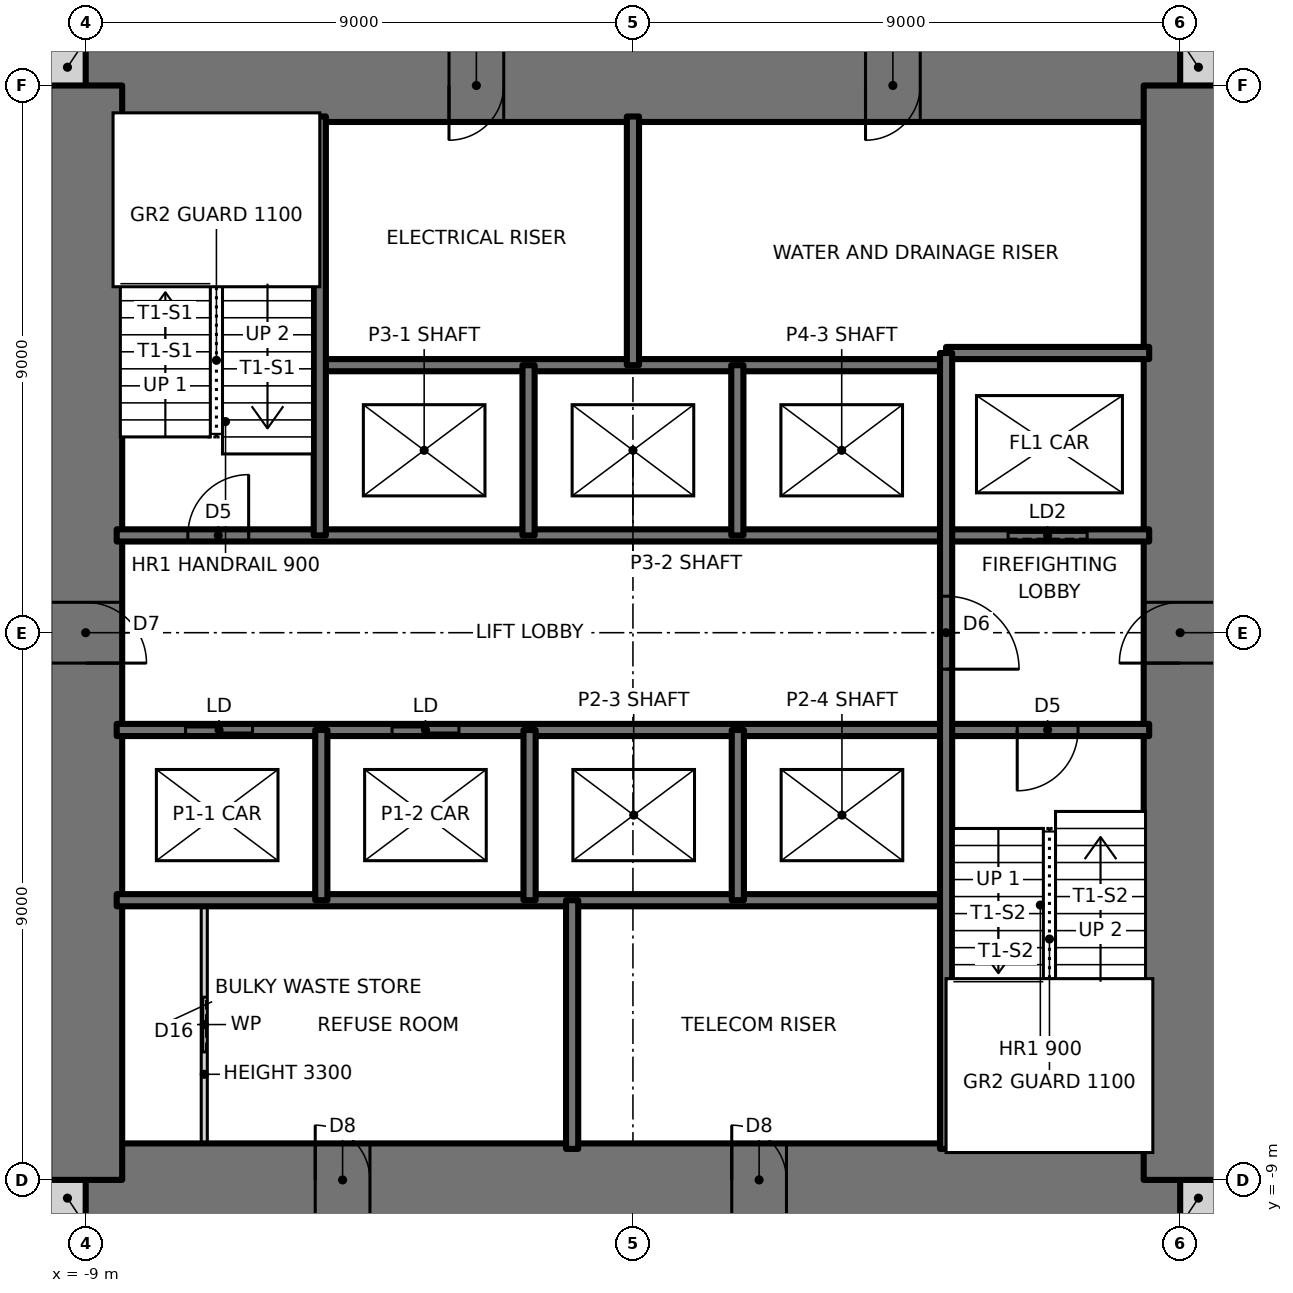
"""IFC4 building model, lengths in metres.
Left out: names, types, materials, properties, quantities, classifications, styles, units other than length and angle.
Written with IfcOpenShell. Run it as: python <this file> out.ifc"""

import sys

from ifc_helpers import new_model, si_unit, direction, frame, frame_2d, origin, place, context, subcontext, project, spatial, rectangle, extrude, element, fill, save


model = new_model("IFC4")
c1 = context("Model", 3, precision=1e-05, world=origin(), true_north=direction((0.0, 1.0)))
c2 = subcontext(c1, "Body", "Model", "MODEL_VIEW")
j1 = project(units=[si_unit("LENGTHUNIT", "METRE"), si_unit("PLANEANGLEUNIT", "RADIAN")], contexts=[c1])
p1 = place(None, origin())
s1 = spatial("IfcSite", under=j1, at=p1, CompositionType="ELEMENT")
p2 = place(p1, origin())
s2 = spatial("IfcBuilding", under=s1, at=p2, CompositionType="ELEMENT")
p3 = place(p2, frame((0.0, 0.0, 15.0)))
s3 = spatial("IfcBuildingStorey", under=s2, at=p3, CompositionType="ELEMENT", Elevation=15.0)
for number, where, z_axis, x_axis in (
    (1, (-9.6, -9.3, 0.0), (0.0, 0.0, 1.0), (1.0, 0.0, 0.0)),
    (2, (9.0, -9.3, 0.0), (0.0, 0.0, 1.0), (1.0, 0.0, 0.0)),
    (3, (9.0, 9.3, 0.0), (0.0, 0.0, 1.0), (1.0, 0.0, 0.0)),
    (4, (-9.6, 9.3, 0.0), (0.0, 0.0, 1.0), (1.0, 0.0, 0.0)),
):
    element("IfcWall", number, at=place(p3, frame(where, z_axis=z_axis, x_axis=x_axis)), inside=s3, PredefinedType="SOLIDWALL", context=c2, shape_type="SweptSolid", body=[
        extrude(rectangle(XDim=0.6, YDim=0.6, at=frame_2d((0.3, 0.0))), origin(), (0.0, 0.0, 1.0), 3.5),
    ])
p4 = place(p3, frame((-9.0, -9.0, 0.0), z_axis=(0.0, 0.0, 1.0), x_axis=(1.0, 0.0, 0.0)))
e5 = element("IfcWall", 5, at=p4, inside=s3, PredefinedType="SHEAR", context=c2, shape_type="SweptSolid", body=[
    extrude(rectangle(XDim=18.0, YDim=1.2, at=frame_2d((9.0, 0.0))), origin(), (0.0, 0.0, 1.0), 3.5),
])
p5 = place(p4, frame((3.775, 0.0, 0.0)))
e6 = element("IfcOpeningElement", 6, at=p5, cuts=e5, PredefinedType="OPENING", context=c2, shape_type="SweptSolid", body=[
    extrude(rectangle(XDim=0.9, YDim=2.1, at=frame_2d((0.45, 1.05))), frame((0.0, 0.61, 0.0), z_axis=(0.0, -1.0, 0.0), x_axis=(1.0, 0.0, 0.0)), (0.0, 0.0, 1.0), 1.22),
])
p6 = place(p4, frame((10.625, 0.0, 0.0)))
e7 = element("IfcOpeningElement", 7, at=p6, cuts=e5, PredefinedType="OPENING", context=c2, shape_type="SweptSolid", body=[
    extrude(rectangle(XDim=0.9, YDim=2.1, at=frame_2d((0.45, 1.05))), frame((0.0, 0.61, 0.0), z_axis=(0.0, -1.0, 0.0), x_axis=(1.0, 0.0, 0.0)), (0.0, 0.0, 1.0), 1.22),
])
p7 = place(p3, frame((9.0, 9.0, 0.0), z_axis=(0.0, 0.0, 1.0), x_axis=(-1.0, 0.0, 0.0)))
e8 = element("IfcWall", 8, at=p7, inside=s3, PredefinedType="SHEAR", context=c2, shape_type="SweptSolid", body=[
    extrude(rectangle(XDim=18.0, YDim=1.2, at=frame_2d((9.0, 0.0))), origin(), (0.0, 0.0, 1.0), 3.5),
])
p8 = place(p7, frame((11.125, 0.0, 0.0)))
e9 = element("IfcOpeningElement", 9, at=p8, cuts=e8, PredefinedType="OPENING", context=c2, shape_type="SweptSolid", body=[
    extrude(rectangle(XDim=0.9, YDim=2.1, at=frame_2d((0.45, 1.05))), frame((0.0, 0.61, 0.0), z_axis=(0.0, -1.0, 0.0), x_axis=(1.0, 0.0, 0.0)), (0.0, 0.0, 1.0), 1.22),
])
p9 = place(p7, frame((4.275, 0.0, 0.0)))
e10 = element("IfcOpeningElement", 10, at=p9, cuts=e8, PredefinedType="OPENING", context=c2, shape_type="SweptSolid", body=[
    extrude(rectangle(XDim=0.9, YDim=2.1, at=frame_2d((0.45, 1.05))), frame((0.0, 0.61, 0.0), z_axis=(0.0, -1.0, 0.0), x_axis=(1.0, 0.0, 0.0)), (0.0, 0.0, 1.0), 1.22),
])
p10 = place(p3, frame((9.0, -9.0, 0.0), z_axis=(0.0, 0.0, 1.0), x_axis=(0.0, 1.0, 0.0)))
e11 = element("IfcWall", 11, at=p10, inside=s3, PredefinedType="SHEAR", context=c2, shape_type="SweptSolid", body=[
    extrude(rectangle(XDim=18.0, YDim=1.2, at=frame_2d((9.0, 0.0))), origin(), (0.0, 0.0, 1.0), 3.5),
])
p11 = place(p10, frame((8.5, 0.0, 0.0)))
e12 = element("IfcOpeningElement", 12, at=p11, cuts=e11, PredefinedType="OPENING", context=c2, shape_type="SweptSolid", body=[
    extrude(rectangle(XDim=1.0, YDim=2.1, at=frame_2d((0.5, 1.05))), frame((0.0, 0.61, 0.0), z_axis=(0.0, -1.0, 0.0), x_axis=(1.0, 0.0, 0.0)), (0.0, 0.0, 1.0), 1.22),
])
p12 = place(p3, frame((-9.0, 9.0, 0.0), z_axis=(0.0, 0.0, 1.0), x_axis=(0.0, -1.0, 0.0)))
e13 = element("IfcWall", 13, at=p12, inside=s3, PredefinedType="SHEAR", context=c2, shape_type="SweptSolid", body=[
    extrude(rectangle(XDim=18.0, YDim=1.2, at=frame_2d((9.0, 0.0))), origin(), (0.0, 0.0, 1.0), 3.5),
])
p13 = place(p12, frame((8.5, 0.0, 0.0)))
e14 = element("IfcOpeningElement", 14, at=p13, cuts=e13, PredefinedType="OPENING", context=c2, shape_type="SweptSolid", body=[
    extrude(rectangle(XDim=1.0, YDim=2.1, at=frame_2d((0.5, 1.05))), frame((0.0, 0.61, 0.0), z_axis=(0.0, -1.0, 0.0), x_axis=(1.0, 0.0, 0.0)), (0.0, 0.0, 1.0), 1.22),
])
p14 = place(p3, frame((-8.49, -4.4, 0.0), z_axis=(0.0, 0.0, 1.0), x_axis=(1.0, 0.0, 0.0)))
e15 = element("IfcWall", 15, at=p14, inside=s3, PredefinedType="SOLIDWALL", context=c2, shape_type="SweptSolid", body=[
    extrude(rectangle(XDim=13.64, YDim=0.2, at=frame_2d((6.82, 0.0))), origin(), (0.0, 0.0, 1.0), 3.5),
])
p15 = place(p3, frame((-8.49, -1.6, 0.0), z_axis=(0.0, 0.0, 1.0), x_axis=(1.0, 0.0, 0.0)))
e16 = element("IfcWall", 16, at=p15, inside=s3, PredefinedType="SOLIDWALL", context=c2, shape_type="SweptSolid", body=[
    extrude(rectangle(XDim=16.98, YDim=0.2, at=frame_2d((8.49, 0.0))), origin(), (0.0, 0.0, 1.0), 3.5),
])
p16 = place(p15, frame((14.81, 0.0, 0.0)))
e17 = element("IfcOpeningElement", 17, at=p16, cuts=e16, PredefinedType="OPENING", context=c2, shape_type="SweptSolid", body=[
    extrude(rectangle(XDim=1.0, YDim=2.1, at=frame_2d((0.5, 1.05))), frame((0.0, 0.11, 0.0), z_axis=(0.0, -1.0, 0.0), x_axis=(1.0, 0.0, 0.0)), (0.0, 0.0, 1.0), 0.22),
])
p17 = place(p15, frame((1.133, 0.0, 0.0)))
e18 = element("IfcOpeningElement", 18, at=p17, cuts=e16, PredefinedType="OPENING", context=c2, shape_type="SweptSolid", body=[
    extrude(rectangle(XDim=1.1, YDim=2.1, at=frame_2d((0.55, 1.05))), frame((0.0, 0.11, 0.0), z_axis=(0.0, -1.0, 0.0), x_axis=(1.0, 0.0, 0.0)), (0.0, 0.0, 1.0), 0.22),
])
p18 = place(p15, frame((4.528, 0.0, 0.0)))
e19 = element("IfcOpeningElement", 19, at=p18, cuts=e16, PredefinedType="OPENING", context=c2, shape_type="SweptSolid", body=[
    extrude(rectangle(XDim=1.1, YDim=2.1, at=frame_2d((0.55, 1.05))), frame((0.0, 0.11, 0.0), z_axis=(0.0, -1.0, 0.0), x_axis=(1.0, 0.0, 0.0)), (0.0, 0.0, 1.0), 0.22),
])
p19 = place(p3, frame((-8.49, 1.6, 0.0), z_axis=(0.0, 0.0, 1.0), x_axis=(1.0, 0.0, 0.0)))
e20 = element("IfcWall", 20, at=p19, inside=s3, PredefinedType="SOLIDWALL", context=c2, shape_type="SweptSolid", body=[
    extrude(rectangle(XDim=16.98, YDim=0.2, at=frame_2d((8.49, 0.0))), origin(), (0.0, 0.0, 1.0), 3.5),
])
p20 = place(p19, frame((1.17, 0.0, 0.0)))
e21 = element("IfcOpeningElement", 21, at=p20, cuts=e20, PredefinedType="OPENING", context=c2, shape_type="SweptSolid", body=[
    extrude(rectangle(XDim=1.0, YDim=2.1, at=frame_2d((0.5, 1.05))), frame((0.0, 0.11, 0.0), z_axis=(0.0, -1.0, 0.0), x_axis=(1.0, 0.0, 0.0)), (0.0, 0.0, 1.0), 0.22),
])
p21 = place(p19, frame((14.66, 0.0, 0.0)))
e22 = element("IfcOpeningElement", 22, at=p21, cuts=e20, PredefinedType="OPENING", context=c2, shape_type="SweptSolid", body=[
    extrude(rectangle(XDim=1.3, YDim=2.1, at=frame_2d((0.65, 1.05))), frame((0.0, 0.11, 0.0), z_axis=(0.0, -1.0, 0.0), x_axis=(1.0, 0.0, 0.0)), (0.0, 0.0, 1.0), 0.22),
])
p22 = place(p3, frame((-5.15, 4.4, 0.0), z_axis=(0.0, 0.0, 1.0), x_axis=(1.0, 0.0, 0.0)))
e23 = element("IfcWall", 23, at=p22, inside=s3, PredefinedType="SOLIDWALL", context=c2, shape_type="SweptSolid", body=[
    extrude(rectangle(XDim=10.3, YDim=0.2, at=frame_2d((5.15, 0.0))), origin(), (0.0, 0.0, 1.0), 3.5),
])
p23 = place(p3, frame((5.15, 4.6, 0.0), z_axis=(0.0, 0.0, 1.0), x_axis=(1.0, 0.0, 0.0)))
e24 = element("IfcWall", 24, at=p23, inside=s3, PredefinedType="SOLIDWALL", context=c2, shape_type="SweptSolid", body=[
    extrude(rectangle(XDim=3.34, YDim=0.2, at=frame_2d((1.67, 0.0))), origin(), (0.0, 0.0, 1.0), 3.5),
])
p24 = place(p3, frame((5.15, -8.49, 0.0), z_axis=(0.0, 0.0, 1.0), x_axis=(0.0, 1.0, 0.0)))
e25 = element("IfcWall", 25, at=p24, inside=s3, PredefinedType="SOLIDWALL", context=c2, shape_type="SweptSolid", body=[
    extrude(rectangle(XDim=13.09, YDim=0.2, at=frame_2d((6.545, 0.0))), origin(), (0.0, 0.0, 1.0), 3.5),
])
p25 = place(p24, frame((7.89, 0.0, 0.0)))
e26 = element("IfcOpeningElement", 26, at=p25, cuts=e25, PredefinedType="OPENING", context=c2, shape_type="SweptSolid", body=[
    extrude(rectangle(XDim=1.2, YDim=2.1, at=frame_2d((0.6, 1.05))), frame((0.0, 0.11, 0.0), z_axis=(0.0, -1.0, 0.0), x_axis=(1.0, 0.0, 0.0)), (0.0, 0.0, 1.0), 0.22),
])
for number, where, z_axis, x_axis in (
    (27, (1.725, -4.4, 0.0), (0.0, 0.0, 1.0), (0.0, 1.0, 0.0)),
    (28, (1.717, 1.6, 0.0), (0.0, 0.0, 1.0), (0.0, 1.0, 0.0)),
):
    element("IfcWall", number, at=place(p3, frame(where, z_axis=z_axis, x_axis=x_axis)), inside=s3, PredefinedType="SOLIDWALL", context=c2, shape_type="SweptSolid", body=[
        extrude(rectangle(XDim=2.8, YDim=0.2, at=frame_2d((1.4, 0.0))), origin(), (0.0, 0.0, 1.0), 3.5),
    ])
for number, where, z_axis, x_axis in (
    (29, (0.0, 4.4, 0.0), (0.0, 0.0, 1.0), (0.0, 1.0, 0.0)),
    (30, (-1.0, -8.49, 0.0), (0.0, 0.0, 1.0), (0.0, 1.0, 0.0)),
):
    element("IfcWall", number, at=place(p3, frame(where, z_axis=z_axis, x_axis=x_axis)), inside=s3, PredefinedType="SOLIDWALL", context=c2, shape_type="SweptSolid", body=[
        extrude(rectangle(XDim=4.09, YDim=0.2, at=frame_2d((2.045, 0.0))), origin(), (0.0, 0.0, 1.0), 3.5),
    ])
for number, where, z_axis, x_axis in (
    (31, (-1.7, -4.4, 0.0), (0.0, 0.0, 1.0), (0.0, 1.0, 0.0)),
    (32, (-1.717, 1.6, 0.0), (0.0, 0.0, 1.0), (0.0, 1.0, 0.0)),
    (33, (-5.125, -4.4, 0.0), (0.0, 0.0, 1.0), (0.0, 1.0, 0.0)),
):
    element("IfcWall", number, at=place(p3, frame(where, z_axis=z_axis, x_axis=x_axis)), inside=s3, PredefinedType="SOLIDWALL", context=c2, shape_type="SweptSolid", body=[
        extrude(rectangle(XDim=2.8, YDim=0.2, at=frame_2d((1.4, 0.0))), origin(), (0.0, 0.0, 1.0), 3.5),
    ])
p26 = place(p3, frame((-5.15, 1.6, 0.0), z_axis=(0.0, 0.0, 1.0), x_axis=(0.0, 1.0, 0.0)))
e34 = element("IfcWall", 34, at=p26, inside=s3, PredefinedType="SOLIDWALL", context=c2, shape_type="SweptSolid", body=[
    extrude(rectangle(XDim=6.89, YDim=0.2, at=frame_2d((3.445, 0.0))), origin(), (0.0, 0.0, 1.0), 3.5),
])
p27 = place(p3, frame((-7.05, -8.49, 0.0), z_axis=(0.0, 0.0, 1.0), x_axis=(0.0, 1.0, 0.0)))
e35 = element("IfcWall", 35, at=p27, inside=s3, PredefinedType="PARTITIONING", context=c2, shape_type="SweptSolid", body=[
    extrude(rectangle(XDim=4.09, YDim=0.1, at=frame_2d((2.045, 0.0))), origin(), (0.0, 0.0, 1.0), 3.3),
])
p28 = place(p27, frame((1.595, 0.0, 0.0)))
e36 = element("IfcOpeningElement", 36, at=p28, cuts=e35, PredefinedType="OPENING", context=c2, shape_type="SweptSolid", body=[
    extrude(rectangle(XDim=0.9, YDim=2.1, at=frame_2d((0.45, 1.05))), frame((0.0, 0.06, 0.0), z_axis=(0.0, -1.0, 0.0), x_axis=(1.0, 0.0, 0.0)), (0.0, 0.0, 1.0), 0.12),
])
p29 = place(p20, origin())
e37 = element("IfcDoor", 37, at=p29, inside=s3, OperationType="SINGLE_SWING_RIGHT", PredefinedType="DOOR", context=c2, shape_type="SweptSolid", body=[
    extrude(rectangle(XDim=1.0, YDim=2.1, at=frame_2d((0.5, 1.05))), frame((0.0, 0.025, 0.0), z_axis=(0.0, -1.0, 0.0), x_axis=(1.0, 0.0, 0.0)), (0.0, 0.0, 1.0), 0.05),
])
fill(e21, e37)
p30 = place(p16, frame((1.0, 0.0, 0.0), z_axis=(0.0, 0.0, 1.0), x_axis=(-1.0, 0.0, 0.0)))
e38 = element("IfcDoor", 38, at=p30, inside=s3, OperationType="SINGLE_SWING_RIGHT", PredefinedType="DOOR", context=c2, shape_type="SweptSolid", body=[
    extrude(rectangle(XDim=1.0, YDim=2.1, at=frame_2d((0.5, 1.05))), frame((0.0, 0.025, 0.0), z_axis=(0.0, -1.0, 0.0), x_axis=(1.0, 0.0, 0.0)), (0.0, 0.0, 1.0), 0.05),
])
fill(e17, e38)
p31 = place(p25, frame((1.2, 0.0, 0.0), z_axis=(0.0, 0.0, 1.0), x_axis=(-1.0, 0.0, 0.0)))
e39 = element("IfcDoor", 39, at=p31, inside=s3, OperationType="SINGLE_SWING_RIGHT", PredefinedType="DOOR", context=c2, shape_type="SweptSolid", body=[
    extrude(rectangle(XDim=1.2, YDim=2.1, at=frame_2d((0.6, 1.05))), frame((0.0, 0.025, 0.0), z_axis=(0.0, -1.0, 0.0), x_axis=(1.0, 0.0, 0.0)), (0.0, 0.0, 1.0), 0.05),
])
fill(e26, e39)
p32 = place(p28, origin())
e40 = element("IfcDoor", 40, at=p32, inside=s3, OperationType="SLIDING_TO_LEFT", PredefinedType="DOOR", context=c2, shape_type="SweptSolid", body=[
    extrude(rectangle(XDim=0.9, YDim=2.1, at=frame_2d((0.45, 1.05))), frame((0.0, 0.025, 0.0), z_axis=(0.0, -1.0, 0.0), x_axis=(1.0, 0.0, 0.0)), (0.0, 0.0, 1.0), 0.05),
])
fill(e36, e40)
p33 = place(p13, origin())
e41 = element("IfcDoor", 41, at=p33, inside=s3, OperationType="SINGLE_SWING_RIGHT", PredefinedType="DOOR", context=c2, shape_type="SweptSolid", body=[
    extrude(rectangle(XDim=1.0, YDim=2.1, at=frame_2d((0.5, 1.05))), frame((0.0, 0.025, 0.0), z_axis=(0.0, -1.0, 0.0), x_axis=(1.0, 0.0, 0.0)), (0.0, 0.0, 1.0), 0.05),
])
fill(e14, e41)
p34 = place(p11, origin())
e42 = element("IfcDoor", 42, at=p34, inside=s3, OperationType="SINGLE_SWING_LEFT", PredefinedType="DOOR", context=c2, shape_type="SweptSolid", body=[
    extrude(rectangle(XDim=1.0, YDim=2.1, at=frame_2d((0.5, 1.05))), frame((0.0, 0.025, 0.0), z_axis=(0.0, -1.0, 0.0), x_axis=(1.0, 0.0, 0.0)), (0.0, 0.0, 1.0), 0.05),
])
fill(e12, e42)
p35 = place(p8, origin())
e43 = element("IfcDoor", 43, at=p35, inside=s3, OperationType="SINGLE_SWING_RIGHT", PredefinedType="DOOR", context=c2, shape_type="SweptSolid", body=[
    extrude(rectangle(XDim=0.9, YDim=2.1, at=frame_2d((0.45, 1.05))), frame((0.0, 0.025, 0.0), z_axis=(0.0, -1.0, 0.0), x_axis=(1.0, 0.0, 0.0)), (0.0, 0.0, 1.0), 0.05),
])
fill(e9, e43)
p36 = place(p9, origin())
e44 = element("IfcDoor", 44, at=p36, inside=s3, OperationType="SINGLE_SWING_RIGHT", PredefinedType="DOOR", context=c2, shape_type="SweptSolid", body=[
    extrude(rectangle(XDim=0.9, YDim=2.1, at=frame_2d((0.45, 1.05))), frame((0.0, 0.025, 0.0), z_axis=(0.0, -1.0, 0.0), x_axis=(1.0, 0.0, 0.0)), (0.0, 0.0, 1.0), 0.05),
])
fill(e10, e44)
p37 = place(p5, origin())
e45 = element("IfcDoor", 45, at=p37, inside=s3, OperationType="SINGLE_SWING_LEFT", PredefinedType="DOOR", context=c2, shape_type="SweptSolid", body=[
    extrude(rectangle(XDim=0.9, YDim=2.1, at=frame_2d((0.45, 1.05))), frame((0.0, 0.025, 0.0), z_axis=(0.0, -1.0, 0.0), x_axis=(1.0, 0.0, 0.0)), (0.0, 0.0, 1.0), 0.05),
])
fill(e6, e45)
p38 = place(p6, origin())
e46 = element("IfcDoor", 46, at=p38, inside=s3, OperationType="SINGLE_SWING_LEFT", PredefinedType="DOOR", context=c2, shape_type="SweptSolid", body=[
    extrude(rectangle(XDim=0.9, YDim=2.1, at=frame_2d((0.45, 1.05))), frame((0.0, 0.025, 0.0), z_axis=(0.0, -1.0, 0.0), x_axis=(1.0, 0.0, 0.0)), (0.0, 0.0, 1.0), 0.05),
])
fill(e7, e46)
p39 = place(p17, origin())
e47 = element("IfcDoor", 47, at=p39, inside=s3, OperationType="DOUBLE_DOOR_SLIDING", PredefinedType="DOOR", context=c2, shape_type="SweptSolid", body=[
    extrude(rectangle(XDim=1.1, YDim=2.1, at=frame_2d((0.55, 1.05))), frame((0.0, 0.025, 0.0), z_axis=(0.0, -1.0, 0.0), x_axis=(1.0, 0.0, 0.0)), (0.0, 0.0, 1.0), 0.05),
])
fill(e18, e47)
p40 = place(p18, origin())
e48 = element("IfcDoor", 48, at=p40, inside=s3, OperationType="DOUBLE_DOOR_SLIDING", PredefinedType="DOOR", context=c2, shape_type="SweptSolid", body=[
    extrude(rectangle(XDim=1.1, YDim=2.1, at=frame_2d((0.55, 1.05))), frame((0.0, 0.025, 0.0), z_axis=(0.0, -1.0, 0.0), x_axis=(1.0, 0.0, 0.0)), (0.0, 0.0, 1.0), 0.05),
])
fill(e19, e48)
p41 = place(p21, origin())
e49 = element("IfcDoor", 49, at=p41, inside=s3, OperationType="SLIDING_TO_LEFT", PredefinedType="DOOR", context=c2, shape_type="SweptSolid", body=[
    extrude(rectangle(XDim=1.3, YDim=2.1, at=frame_2d((0.65, 1.05))), frame((0.0, 0.025, 0.0), z_axis=(0.0, -1.0, 0.0), x_axis=(1.0, 0.0, 0.0)), (0.0, 0.0, 1.0), 0.05),
])
fill(e22, e49)
save(model, sys.argv[1])
